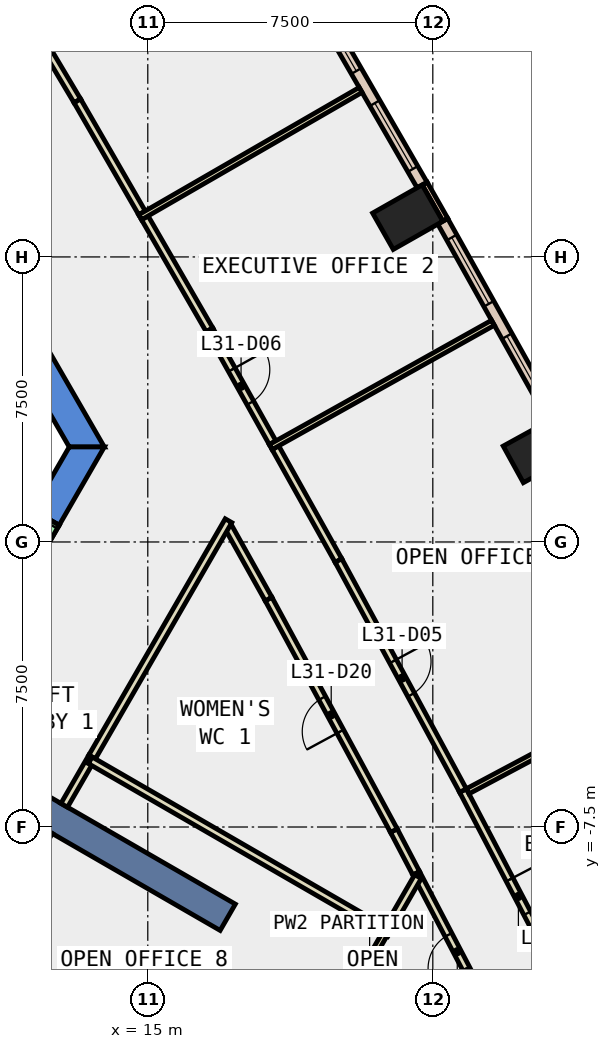
"""IFC4 building model, lengths in metres.
Left out: names, types, materials, properties, quantities, classifications, styles, units other than length and angle.
Written with IfcOpenShell. Run it as: python <this file> out.ifc"""

import sys

from ifc_helpers import new_model, si_unit, direction, frame, frame_2d, origin, origin_2d, place, context, subcontext, project, spatial, polyline, rectangle, outline, extrude, element, fill, save


model = new_model("IFC4")
c1 = context("Model", 3, precision=1e-05, world=origin(), true_north=direction((0.0, 1.0)))
c2 = subcontext(c1, "Body", "Model", "MODEL_VIEW")
j1 = project(units=[si_unit("LENGTHUNIT", "METRE"), si_unit("PLANEANGLEUNIT", "RADIAN")], contexts=[c1])
p1 = place(None, origin())
s1 = spatial("IfcSite", under=j1, at=p1, CompositionType="ELEMENT")
p2 = place(p1, origin())
s2 = spatial("IfcBuilding", under=s1, at=p2, CompositionType="ELEMENT")
p3 = place(p2, frame((0.0, 0.0, 142.4)))
s3 = spatial("IfcBuildingStorey", under=s2, at=p3, CompositionType="ELEMENT", Elevation=142.4)
for number, where, z_axis, x_axis in (
    (1, (25.275, 2.403, -0.4), (0.0, 0.0, 1.0), (-0.482, 0.876, 0.0)),
    (2, (21.84, 8.546, -0.4), (0.0, 0.0, 1.0), (-0.494, 0.869, 0.0)),
):
    element("IfcColumn", number, at=place(p3, frame(where, z_axis=z_axis, x_axis=x_axis)), inside=s3, PredefinedType="COLUMN", context=c2, shape_type="SweptSolid", body=[
        extrude(rectangle(XDim=1.1, YDim=1.5, at=origin_2d()), origin(), (0.0, 0.0, 1.0), 4.2),
    ])
p4 = place(p3, frame((0.0, 0.0, -0.4)))
e3 = element("IfcWall", 3, at=p4, inside=s3, PredefinedType="SHEAR", context=c2, shape_type="SweptSolid", body=[
    extrude(outline(polyline([(8.517, 11.748), (7.824, 11.348), (12.933, 2.5), (13.856, 2.5), (8.517, 11.748)])), origin(), (0.0, 0.0, 1.0), 4.2),
])
p5 = place(p3, frame((0.0, 0.0, -0.4)))
e4 = element("IfcWall", 4, at=p5, inside=s3, PredefinedType="SHEAR", context=c2, shape_type="SweptSolid", body=[
    extrude(outline(polyline([(11.974, 0.84), (12.667, 0.44), (13.856, 2.5), (12.933, 2.5), (11.974, 0.84)])), origin(), (0.0, 0.0, 1.0), 4.2),
])
p6 = place(p3, frame((0.0, 0.0, 3.6)))
e5 = element("IfcWall", 5, at=p6, inside=s3, PredefinedType="SHEAR", context=c2, shape_type="SweptSolid", body=[
    extrude(outline(polyline([(12.667, 0.44), (11.974, 0.84), (11.324, -0.286), (12.017, -0.686), (12.667, 0.44)])), origin(), (0.0, 0.0, 1.0), 0.2),
])
p7 = place(p3, frame((9.31, -5.375, -0.4), z_axis=(0.0, 0.0, 1.0), x_axis=(0.866017533419, -0.500013631625, 0.0)))
e6 = element("IfcWall", 6, at=p7, inside=s3, PredefinedType="SHEAR", context=c2, shape_type="SweptSolid", body=[
    extrude(rectangle(XDim=9.0, YDim=0.8, at=frame_2d((4.5, 0.0))), origin(), (0.0, 0.0, 1.0), 4.2),
])
p8 = place(p3, frame((22.83, 8.476, 0.0), z_axis=(0.0, 0.0, 1.0), x_axis=(-0.494775760346, 0.869020682708, 0.0)))
e7 = element("IfcWall", 7, at=p8, inside=s3, PredefinedType="STANDARD", context=c2, shape_type="SweptSolid", body=[
    extrude(rectangle(XDim=1.1, YDim=0.15, at=frame_2d((0.55, 0.0))), origin(), (0.0, 0.0, 1.0), 3.8),
])
p9 = place(p3, frame((25.665, 3.244, 0.0), z_axis=(0.0, 0.0, 1.0), x_axis=(-0.488009846284, 0.872838123555, 0.0)))
e8 = element("IfcWall", 8, at=p9, inside=s3, PredefinedType="STANDARD", context=c2, shape_type="SweptSolid", body=[
    extrude(rectangle(XDim=5.951, YDim=0.3, at=frame_2d((2.976, 0.0))), origin(), (0.0, 0.0, 1.0), 3.8),
])
p10 = place(p9, frame((0.488, 0.0, 0.9)))
e9 = element("IfcOpeningElement", 9, at=p10, cuts=e8, PredefinedType="OPENING", context=c2, shape_type="SweptSolid", body=[
    extrude(rectangle(XDim=2.0, YDim=2.6, at=frame_2d((1.0, 1.3))), frame((0.0, 0.16, 0.0), z_axis=(0.0, -1.0, 0.0), x_axis=(1.0, 0.0, 0.0)), (0.0, 0.0, 1.0), 0.32),
])
p11 = place(p9, frame((3.463, 0.0, 0.9)))
e10 = element("IfcOpeningElement", 10, at=p11, cuts=e8, PredefinedType="OPENING", context=c2, shape_type="SweptSolid", body=[
    extrude(rectangle(XDim=2.0, YDim=2.6, at=frame_2d((1.0, 1.3))), frame((0.0, 0.16, 0.0), z_axis=(0.0, -1.0, 0.0), x_axis=(1.0, 0.0, 0.0)), (0.0, 0.0, 1.0), 0.32),
])
p12 = place(p3, frame((22.218, 9.392, 0.0), z_axis=(0.0, 0.0, 1.0), x_axis=(-0.49994263896, 0.866058518664, 0.0)))
e11 = element("IfcWall", 11, at=p12, inside=s3, PredefinedType="STANDARD", context=c2, shape_type="SweptSolid", body=[
    extrude(rectangle(XDim=5.951, YDim=0.3, at=frame_2d((2.976, 0.0))), origin(), (0.0, 0.0, 1.0), 3.8),
])
p13 = place(p12, frame((0.488, 0.0, 0.9)))
e12 = element("IfcOpeningElement", 12, at=p13, cuts=e11, PredefinedType="OPENING", context=c2, shape_type="SweptSolid", body=[
    extrude(rectangle(XDim=2.0, YDim=2.6, at=frame_2d((1.0, 1.3))), frame((0.0, 0.16, 0.0), z_axis=(0.0, -1.0, 0.0), x_axis=(1.0, 0.0, 0.0)), (0.0, 0.0, 1.0), 0.32),
])
p14 = place(p12, frame((3.463, 0.0, 0.9)))
e13 = element("IfcOpeningElement", 13, at=p14, cuts=e11, PredefinedType="OPENING", context=c2, shape_type="SweptSolid", body=[
    extrude(rectangle(XDim=2.0, YDim=2.6, at=frame_2d((1.0, 1.3))), frame((0.0, 0.16, 0.0), z_axis=(0.0, -1.0, 0.0), x_axis=(1.0, 0.0, 0.0)), (0.0, 0.0, 1.0), 0.32),
])
p15 = place(p3, frame((22.063, -8.717, 0.0), z_axis=(0.0, 0.0, 1.0), x_axis=(-0.463776683525, 0.885952136302, 0.0)))
e14 = element("IfcWall", 14, at=p15, inside=s3, PredefinedType="PARTITIONING", context=c2, shape_type="SweptSolid", body=[
    extrude(rectangle(XDim=1.268, YDim=0.2, at=frame_2d((0.634, 0.0))), origin(), (0.0, 0.0, 1.0), 3.8),
])
p16 = place(p3, frame((21.475, -7.594, 0.0), z_axis=(0.0, 0.0, 1.0), x_axis=(-0.475918691018, 0.879489283357, 0.0)))
e15 = element("IfcWall", 15, at=p16, inside=s3, PredefinedType="PARTITIONING", context=c2, shape_type="SweptSolid", body=[
    extrude(rectangle(XDim=6.928, YDim=0.2, at=frame_2d((3.464, 0.0))), origin(), (0.0, 0.0, 1.0), 3.8),
])
p17 = place(p16, frame((2.964, 0.0, 0.0)))
e16 = element("IfcOpeningElement", 16, at=p17, cuts=e15, PredefinedType="OPENING", context=c2, shape_type="SweptSolid", body=[
    extrude(rectangle(XDim=1.0, YDim=2.1, at=frame_2d((0.5, 1.05))), frame((0.0, 0.11, 0.0), z_axis=(0.0, -1.0, 0.0), x_axis=(1.0, 0.0, 0.0)), (0.0, 0.0, 1.0), 0.22),
])
p18 = place(p3, frame((18.178, -1.501, 0.0), z_axis=(0.0, 0.0, 1.0), x_axis=(-0.487980809747, 0.872854357449, 0.0)))
e17 = element("IfcWall", 17, at=p18, inside=s3, PredefinedType="PARTITIONING", context=c2, shape_type="SweptSolid", body=[
    extrude(rectangle(XDim=2.162, YDim=0.2, at=frame_2d((1.081, 0.0))), origin(), (0.0, 0.0, 1.0), 3.8),
])
p19 = place(p3, frame((24.224, -12.845, 0.0), z_axis=(0.0, 0.0, 1.0), x_axis=(-0.463819025987, 0.885929969655, 0.0)))
e18 = element("IfcWall", 18, at=p19, inside=s3, PredefinedType="PARTITIONING", context=c2, shape_type="SweptSolid", body=[
    extrude(rectangle(XDim=4.659, YDim=0.2, at=frame_2d((2.33, 0.0))), origin(), (0.0, 0.0, 1.0), 3.8),
])
p20 = place(p19, frame((1.83, 0.0, 0.0)))
e19 = element("IfcOpeningElement", 19, at=p20, cuts=e18, PredefinedType="OPENING", context=c2, shape_type="SweptSolid", body=[
    extrude(rectangle(XDim=1.0, YDim=2.1, at=frame_2d((0.5, 1.05))), frame((0.0, 0.11, 0.0), z_axis=(0.0, -1.0, 0.0), x_axis=(1.0, 0.0, 0.0)), (0.0, 0.0, 1.0), 0.22),
])
p21 = place(p3, frame((23.294, -6.541, 0.0), z_axis=(0.0, 0.0, 1.0), x_axis=(0.463802391881, -0.885938678062, 0.0)))
e20 = element("IfcWall", 20, at=p21, inside=s3, PredefinedType="PARTITIONING", context=c2, shape_type="SweptSolid", body=[
    extrude(rectangle(XDim=6.287, YDim=0.2, at=frame_2d((3.144, 0.0))), origin(), (0.0, 0.0, 1.0), 3.8),
])
p22 = place(p21, frame((2.644, 0.0, 0.0)))
e21 = element("IfcOpeningElement", 21, at=p22, cuts=e20, PredefinedType="OPENING", context=c2, shape_type="SweptSolid", body=[
    extrude(rectangle(XDim=1.0, YDim=2.1, at=frame_2d((0.5, 1.05))), frame((0.0, 0.11, 0.0), z_axis=(0.0, -1.0, 0.0), x_axis=(1.0, 0.0, 0.0)), (0.0, 0.0, 1.0), 0.22),
])
p23 = place(p3, frame((18.358, 2.481, 0.0), z_axis=(0.0, 0.0, 1.0), x_axis=(0.48792588674, -0.872885060617, 0.0)))
e22 = element("IfcWall", 22, at=p23, inside=s3, PredefinedType="PARTITIONING", context=c2, shape_type="SweptSolid", body=[
    extrude(rectangle(XDim=3.403, YDim=0.2, at=frame_2d((1.701, 0.0))), origin(), (0.0, 0.0, 1.0), 3.8),
])
p24 = place(p3, frame((20.018, -0.489, 0.0), z_axis=(0.0, 0.0, 1.0), x_axis=(0.476025981828, -0.87943121654, 0.0)))
e23 = element("IfcWall", 23, at=p24, inside=s3, PredefinedType="PARTITIONING", context=c2, shape_type="SweptSolid", body=[
    extrude(rectangle(XDim=6.882, YDim=0.2, at=frame_2d((3.441, 0.0))), origin(), (0.0, 0.0, 1.0), 3.8),
])
p25 = place(p24, frame((3.016, 0.0, 0.0)))
e24 = element("IfcOpeningElement", 24, at=p25, cuts=e23, PredefinedType="OPENING", context=c2, shape_type="SweptSolid", body=[
    extrude(rectangle(XDim=1.0, YDim=2.1, at=frame_2d((0.5, 1.05))), frame((0.0, 0.11, 0.0), z_axis=(0.0, -1.0, 0.0), x_axis=(1.0, 0.0, 0.0)), (0.0, 0.0, 1.0), 0.22),
])
p26 = place(p3, frame((14.922, 8.529, 0.0), z_axis=(0.0, 0.0, 1.0), x_axis=(0.500097109062, -0.865969330582, 0.0)))
e25 = element("IfcWall", 25, at=p26, inside=s3, PredefinedType="PARTITIONING", context=c2, shape_type="SweptSolid", body=[
    extrude(rectangle(XDim=3.403, YDim=0.2, at=frame_2d((1.702, 0.0))), origin(), (0.0, 0.0, 1.0), 3.8),
])
p27 = place(p3, frame((16.624, 5.582, 0.0), z_axis=(0.0, 0.0, 1.0), x_axis=(0.487871212611, -0.872915620152, 0.0)))
e26 = element("IfcWall", 26, at=p27, inside=s3, PredefinedType="PARTITIONING", context=c2, shape_type="SweptSolid", body=[
    extrude(rectangle(XDim=3.402, YDim=0.2, at=frame_2d((1.701, 0.0))), origin(), (0.0, 0.0, 1.0), 3.8),
])
p28 = place(p27, frame((1.202, 0.0, 0.0)))
e27 = element("IfcOpeningElement", 27, at=p28, cuts=e26, PredefinedType="OPENING", context=c2, shape_type="SweptSolid", body=[
    extrude(rectangle(XDim=1.0, YDim=2.1, at=frame_2d((0.5, 1.05))), frame((0.0, 0.11, 0.0), z_axis=(0.0, -1.0, 0.0), x_axis=(1.0, 0.0, 0.0)), (0.0, 0.0, 1.0), 0.22),
])
p29 = place(p3, frame((9.548, 17.645, 0.0), z_axis=(0.0, 0.0, 1.0), x_axis=(0.511822081848, -0.859091471575, 0.0)))
e28 = element("IfcWall", 28, at=p29, inside=s3, PredefinedType="PARTITIONING", context=c2, shape_type="SweptSolid", body=[
    extrude(rectangle(XDim=7.03, YDim=0.2, at=frame_2d((3.515, 0.0))), origin(), (0.0, 0.0, 1.0), 3.8),
])
p30 = place(p29, frame((3.015, 0.0, 0.0)))
e29 = element("IfcOpeningElement", 29, at=p30, cuts=e28, PredefinedType="OPENING", context=c2, shape_type="SweptSolid", body=[
    extrude(rectangle(XDim=1.0, YDim=2.1, at=frame_2d((0.5, 1.05))), frame((0.0, 0.11, 0.0), z_axis=(0.0, -1.0, 0.0), x_axis=(1.0, 0.0, 0.0)), (0.0, 0.0, 1.0), 0.22),
])
p31 = place(p3, frame((13.146, 11.606, 0.0), z_axis=(0.0, 0.0, 1.0), x_axis=(0.499881871653, -0.866093594476, 0.0)))
e30 = element("IfcWall", 30, at=p31, inside=s3, PredefinedType="PARTITIONING", context=c2, shape_type="SweptSolid", body=[
    extrude(rectangle(XDim=3.403, YDim=0.2, at=frame_2d((1.701, 0.0))), origin(), (0.0, 0.0, 1.0), 3.8),
])
p32 = place(p3, frame((13.535, -5.657, 0.0), z_axis=(0.0, 0.0, 1.0), x_axis=(-0.499751238113, -0.866168978898, 0.0)))
e31 = element("IfcWall", 31, at=p32, inside=s3, PredefinedType="PARTITIONING", context=c2, shape_type="SweptSolid", body=[
    extrude(rectangle(XDim=1.469, YDim=0.2, at=frame_2d((0.734, 0.0))), origin(), (0.0, 0.0, 1.0), 3.8),
])
p33 = place(p3, frame((17.124, 0.56, 0.0), z_axis=(0.0, 0.0, 1.0), x_axis=(-0.49996876383, -0.866043437245, 0.0)))
e32 = element("IfcWall", 32, at=p33, inside=s3, PredefinedType="PARTITIONING", context=c2, shape_type="SweptSolid", body=[
    extrude(rectangle(XDim=7.179, YDim=0.2, at=frame_2d((3.589, 0.0))), origin(), (0.0, 0.0, 1.0), 3.8),
])
p34 = place(p3, frame((13.485, -5.744, 0.0), z_axis=(0.0, 0.0, 1.0), x_axis=(0.865950545648, -0.500129635687, 0.0)))
e33 = element("IfcWall", 33, at=p34, inside=s3, PredefinedType="PARTITIONING", context=c2, shape_type="SweptSolid", body=[
    extrude(rectangle(XDim=9.1, YDim=0.2, at=frame_2d((4.55, 0.0))), origin(), (0.0, 0.0, 1.0), 3.8),
])
p35 = place(p3, frame((21.228, -10.331, 0.0), z_axis=(0.0, 0.0, 1.0), x_axis=(-0.499920861661, -0.866071089505, 0.0)))
e34 = element("IfcWall", 34, at=p35, inside=s3, PredefinedType="PARTITIONING", context=c2, shape_type="SweptSolid", body=[
    extrude(rectangle(XDim=1.562, YDim=0.15, at=frame_2d((0.781, 0.0))), origin(), (0.0, 0.0, 1.0), 3.8),
])
p36 = place(p3, frame((22.109, -8.805, 0.0), z_axis=(0.0, 0.0, 1.0), x_axis=(-0.499920861661, -0.866071089505, 0.0)))
e35 = element("IfcWall", 35, at=p36, inside=s3, PredefinedType="PARTITIONING", context=c2, shape_type="SweptSolid", body=[
    extrude(rectangle(XDim=1.562, YDim=0.2, at=frame_2d((0.781, 0.0))), origin(), (0.0, 0.0, 1.0), 3.8),
])
p37 = place(p3, frame((23.417, -6.56, 0.0), z_axis=(0.0, 0.0, 1.0), x_axis=(0.882784638588, 0.469777906967, 0.0)))
e36 = element("IfcWall", 36, at=p37, inside=s3, PredefinedType="PARTITIONING", context=c2, shape_type="SweptSolid", body=[
    extrude(rectangle(XDim=5.13, YDim=0.15, at=frame_2d((2.565, 0.0))), origin(), (0.0, 0.0, 1.0), 3.8),
])
p38 = place(p3, frame((18.234, 2.497, 0.0), z_axis=(0.0, 0.0, 1.0), x_axis=(0.872820235044, 0.4880418397, 0.0)))
e37 = element("IfcWall", 37, at=p38, inside=s3, PredefinedType="PARTITIONING", context=c2, shape_type="SweptSolid", body=[
    extrude(rectangle(XDim=6.7, YDim=0.15, at=frame_2d((3.35, 0.0))), origin(), (0.0, 0.0, 1.0), 3.8),
])
p39 = place(p3, frame((14.798, 8.544, 0.0), z_axis=(0.0, 0.0, 1.0), x_axis=(0.866041788654, 0.4999716195, 0.0)))
e38 = element("IfcWall", 38, at=p39, inside=s3, PredefinedType="PARTITIONING", context=c2, shape_type="SweptSolid", body=[
    extrude(rectangle(XDim=6.701, YDim=0.15, at=frame_2d((3.35, 0.0))), origin(), (0.0, 0.0, 1.0), 3.8),
])
p40 = place(p3, frame((12.401, -7.621, 0.0), z_axis=(0.0, 0.0, 1.0), x_axis=(-0.499964151829, -0.866046099747, 0.0)))
e39 = element("IfcWall", 39, at=p40, inside=s3, PredefinedType="PARTITIONING", context=c2, shape_type="SweptSolid", body=[
    extrude(rectangle(XDim=8.656, YDim=0.2, at=frame_2d((4.328, 0.0))), origin(), (0.0, 0.0, 1.0), 3.8),
])
p41 = place(p40, frame((2.694, 0.0, 0.0)))
e40 = element("IfcOpeningElement", 40, at=p41, cuts=e39, PredefinedType="OPENING", context=c2, shape_type="SweptSolid", body=[
    extrude(rectangle(XDim=1.0, YDim=2.1, at=frame_2d((0.5, 1.05))), frame((0.0, 0.11, 0.0), z_axis=(0.0, -1.0, 0.0), x_axis=(1.0, 0.0, 0.0)), (0.0, 0.0, 1.0), 0.22),
])
p42 = place(p40, frame((3.794, 0.0, 0.0)))
e41 = element("IfcOpeningElement", 41, at=p42, cuts=e39, PredefinedType="OPENING", context=c2, shape_type="SweptSolid", body=[
    extrude(rectangle(XDim=1.0, YDim=2.1, at=frame_2d((0.5, 1.05))), frame((0.0, 0.11, 0.0), z_axis=(0.0, -1.0, 0.0), x_axis=(1.0, 0.0, 0.0)), (0.0, 0.0, 1.0), 0.22),
])
p43 = place(p3, frame((11.498, -0.385, 0.0), z_axis=(0.0, 0.0, 1.0), x_axis=(0.500221244143, 0.865897630733, 0.0)))
e42 = element("IfcWall", 42, at=p43, inside=s3, PredefinedType="STANDARD", context=c2, shape_type="SweptSolid", body=[
    extrude(rectangle(XDim=1.299, YDim=1.2, at=frame_2d((0.65, 0.0))), origin(), (0.0, 0.0, 1.0), 2.4),
])
p44 = place(p43, frame((0.1, 0.0, 0.0)))
e43 = element("IfcOpeningElement", 43, at=p44, cuts=e42, PredefinedType="OPENING", context=c2, shape_type="SweptSolid", body=[
    extrude(rectangle(XDim=1.1, YDim=2.3, at=frame_2d((0.55, 1.15))), frame((0.0, 0.61, 0.0), z_axis=(0.0, -1.0, 0.0), x_axis=(1.0, 0.0, 0.0)), (0.0, 0.0, 1.0), 1.22),
])
p45 = place(p10, origin())
e44 = element("IfcWindow", 44, at=p45, inside=s3, PartitioningType="SINGLE_PANEL", PredefinedType="WINDOW", context=c2, shape_type="SweptSolid", body=[
    extrude(rectangle(XDim=2.0, YDim=2.6, at=frame_2d((1.0, 1.3))), frame((0.0, 0.03, 0.0), z_axis=(0.0, -1.0, 0.0), x_axis=(1.0, 0.0, 0.0)), (0.0, 0.0, 1.0), 0.06),
])
fill(e9, e44)
p46 = place(p11, origin())
e45 = element("IfcWindow", 45, at=p46, inside=s3, PartitioningType="SINGLE_PANEL", PredefinedType="WINDOW", context=c2, shape_type="SweptSolid", body=[
    extrude(rectangle(XDim=2.0, YDim=2.6, at=frame_2d((1.0, 1.3))), frame((0.0, 0.03, 0.0), z_axis=(0.0, -1.0, 0.0), x_axis=(1.0, 0.0, 0.0)), (0.0, 0.0, 1.0), 0.06),
])
fill(e10, e45)
p47 = place(p13, origin())
e46 = element("IfcWindow", 46, at=p47, inside=s3, PartitioningType="SINGLE_PANEL", PredefinedType="WINDOW", context=c2, shape_type="SweptSolid", body=[
    extrude(rectangle(XDim=2.0, YDim=2.6, at=frame_2d((1.0, 1.3))), frame((0.0, 0.03, 0.0), z_axis=(0.0, -1.0, 0.0), x_axis=(1.0, 0.0, 0.0)), (0.0, 0.0, 1.0), 0.06),
])
fill(e12, e46)
p48 = place(p14, origin())
e47 = element("IfcWindow", 47, at=p48, inside=s3, PartitioningType="SINGLE_PANEL", PredefinedType="WINDOW", context=c2, shape_type="SweptSolid", body=[
    extrude(rectangle(XDim=2.0, YDim=2.6, at=frame_2d((1.0, 1.3))), frame((0.0, 0.03, 0.0), z_axis=(0.0, -1.0, 0.0), x_axis=(1.0, 0.0, 0.0)), (0.0, 0.0, 1.0), 0.06),
])
fill(e13, e47)
p49 = place(p22, origin())
e48 = element("IfcDoor", 48, at=p49, inside=s3, OperationType="SINGLE_SWING_LEFT", PredefinedType="DOOR", context=c2, shape_type="SweptSolid", body=[
    extrude(rectangle(XDim=1.0, YDim=2.1, at=frame_2d((0.5, 1.05))), frame((0.0, 0.025, 0.0), z_axis=(0.0, -1.0, 0.0), x_axis=(1.0, 0.0, 0.0)), (0.0, 0.0, 1.0), 0.05),
])
fill(e21, e48)
p50 = place(p25, origin())
e49 = element("IfcDoor", 49, at=p50, inside=s3, OperationType="SINGLE_SWING_LEFT", PredefinedType="DOOR", context=c2, shape_type="SweptSolid", body=[
    extrude(rectangle(XDim=1.0, YDim=2.1, at=frame_2d((0.5, 1.05))), frame((0.0, 0.025, 0.0), z_axis=(0.0, -1.0, 0.0), x_axis=(1.0, 0.0, 0.0)), (0.0, 0.0, 1.0), 0.05),
])
fill(e24, e49)
p51 = place(p28, origin())
e50 = element("IfcDoor", 50, at=p51, inside=s3, OperationType="SINGLE_SWING_LEFT", PredefinedType="DOOR", context=c2, shape_type="SweptSolid", body=[
    extrude(rectangle(XDim=1.0, YDim=2.1, at=frame_2d((0.5, 1.05))), frame((0.0, 0.025, 0.0), z_axis=(0.0, -1.0, 0.0), x_axis=(1.0, 0.0, 0.0)), (0.0, 0.0, 1.0), 0.05),
])
fill(e27, e50)
p52 = place(p17, origin())
e51 = element("IfcDoor", 51, at=p52, inside=s3, OperationType="SINGLE_SWING_LEFT", PredefinedType="DOOR", context=c2, shape_type="SweptSolid", body=[
    extrude(rectangle(XDim=1.0, YDim=2.1, at=frame_2d((0.5, 1.05))), frame((0.0, 0.025, 0.0), z_axis=(0.0, -1.0, 0.0), x_axis=(1.0, 0.0, 0.0)), (0.0, 0.0, 1.0), 0.05),
])
fill(e16, e51)
p53 = place(p20, origin())
e52 = element("IfcDoor", 52, at=p53, inside=s3, OperationType="SINGLE_SWING_LEFT", PredefinedType="DOOR", context=c2, shape_type="SweptSolid", body=[
    extrude(rectangle(XDim=1.0, YDim=2.1, at=frame_2d((0.5, 1.05))), frame((0.0, 0.025, 0.0), z_axis=(0.0, -1.0, 0.0), x_axis=(1.0, 0.0, 0.0)), (0.0, 0.0, 1.0), 0.05),
])
fill(e19, e52)
save(model, sys.argv[1])
